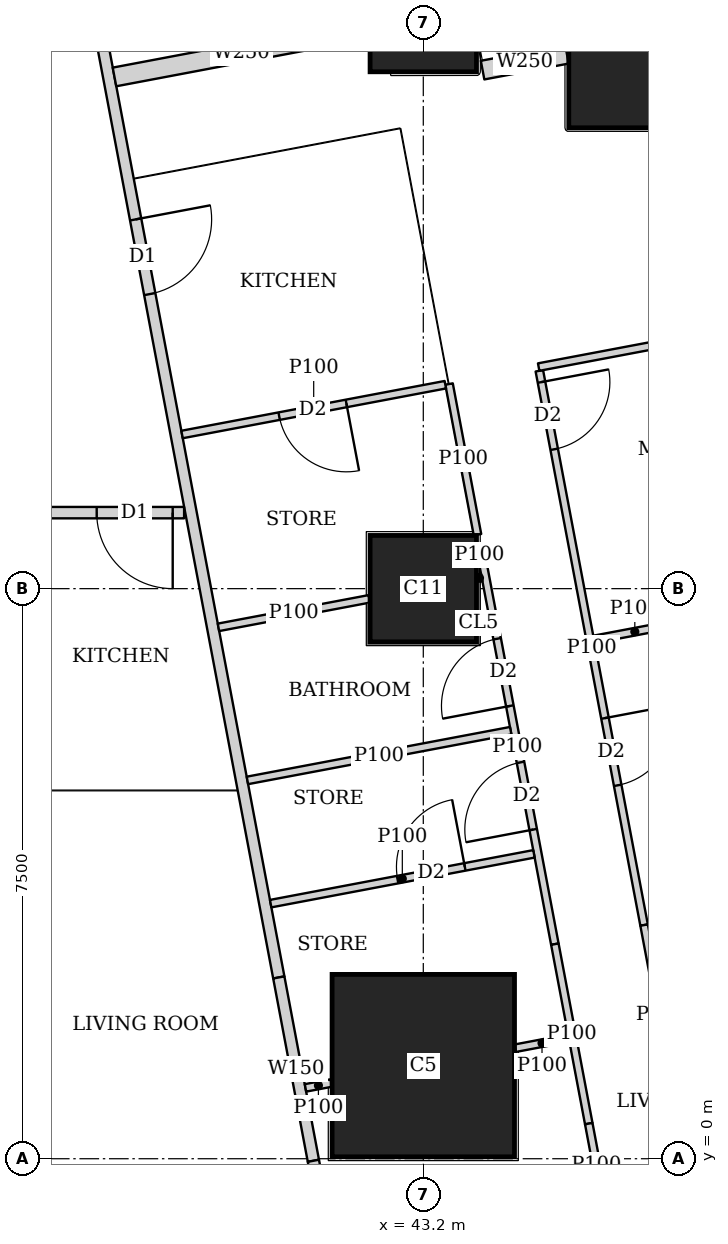
"""IFC4 building model, lengths in metres.
Left out: names, types, materials, properties, quantities, classifications, styles, units other than length and angle.
Written with IfcOpenShell. Run it as: python <this file> out.ifc"""

import sys

from ifc_helpers import new_model, si_unit, direction, frame, frame_2d, origin, origin_2d, place, context, subcontext, project, spatial, rectangle, extrude, element, fill, save


model = new_model("IFC4")
c1 = context("Model", 3, precision=1e-05, world=origin(), true_north=direction((0.0, 1.0)))
c2 = subcontext(c1, "Body", "Model", "MODEL_VIEW")
j1 = project(units=[si_unit("LENGTHUNIT", "METRE"), si_unit("PLANEANGLEUNIT", "RADIAN")], contexts=[c1])
p1 = place(None, origin())
s1 = spatial("IfcSite", under=j1, at=p1, CompositionType="ELEMENT")
p2 = place(p1, origin())
s2 = spatial("IfcBuilding", under=s1, at=p2, CompositionType="ELEMENT")
p3 = place(p2, frame((0.0, 0.0, 223.7)))
s3 = spatial("IfcBuildingStorey", under=s2, at=p3, CompositionType="ELEMENT", Elevation=223.7)
p4 = place(p3, frame((43.2, 1.225, 0.0), z_axis=(0.0, 0.0, 1.0), x_axis=(1.0, 0.0, 0.0)))
e1 = element("IfcColumn", 1, at=p4, inside=s3, PredefinedType="COLUMN", context=c2, shape_type="SweptSolid", body=[
    extrude(rectangle(XDim=2.4, YDim=2.4, at=origin_2d()), origin(), (0.0, 0.0, 1.0), 3.75),
])
for number, where, z_axis, x_axis in (
    (2, (43.2, 7.5, 0.0), (0.0, 0.0, 1.0), (1.0, 0.0, 0.0)),
    (3, (43.2, 15.0, 0.0), (0.0, 0.0, 1.0), (1.0, 0.0, 0.0)),
):
    element("IfcColumn", number, at=place(p3, frame(where, z_axis=z_axis, x_axis=x_axis)), inside=s3, PredefinedType="COLUMN", context=c2, shape_type="SweptSolid", body=[
        extrude(rectangle(XDim=1.4, YDim=1.4, at=origin_2d()), origin(), (0.0, 0.0, 1.0), 3.75),
    ])
p5 = place(p3, frame((46.314, 14.763, 0.0), z_axis=(0.0, 0.0, 1.0), x_axis=(1.0, 0.0, 0.0)))
e4 = element("IfcColumn", 4, at=p5, inside=s3, PredefinedType="COLUMN", context=c2, shape_type="SweptSolid", body=[
    extrude(rectangle(XDim=2.4, YDim=2.4, at=origin_2d()), origin(), (0.0, 0.0, 1.0), 3.75),
])
p6 = place(p3, frame((50.653, 2.703, 0.0), z_axis=(0.0, 0.0, 1.0), x_axis=(-0.185612026696, 0.982623109613, 0.0)))
e5 = element("IfcWall", 5, at=p6, inside=s3, PredefinedType="SOLIDWALL", context=c2, shape_type="SweptSolid", body=[
    extrude(rectangle(XDim=41.393, YDim=0.2, at=frame_2d((20.697, 0.0))), origin(), (0.0, 0.0, 1.0), 3.5),
])
p7 = place(p6, frame((1.633, 0.0, 0.9)))
e6 = element("IfcOpeningElement", 6, at=p7, cuts=e5, PredefinedType="OPENING", context=c2, shape_type="SweptSolid", body=[
    extrude(rectangle(XDim=1.8, YDim=1.5, at=frame_2d((0.9, 0.75))), frame((0.0, 0.11, 0.0), z_axis=(0.0, -1.0, 0.0), x_axis=(1.0, 0.0, 0.0)), (0.0, 0.0, 1.0), 0.22),
])
p8 = place(p6, frame((6.032, 0.0, 0.9)))
e7 = element("IfcOpeningElement", 7, at=p8, cuts=e5, PredefinedType="OPENING", context=c2, shape_type="SweptSolid", body=[
    extrude(rectangle(XDim=1.8, YDim=1.5, at=frame_2d((0.9, 0.75))), frame((0.0, 0.11, 0.0), z_axis=(0.0, -1.0, 0.0), x_axis=(1.0, 0.0, 0.0)), (0.0, 0.0, 1.0), 0.22),
])
p9 = place(p6, frame((9.848, 0.0, 0.9)))
e8 = element("IfcOpeningElement", 8, at=p9, cuts=e5, PredefinedType="OPENING", context=c2, shape_type="SweptSolid", body=[
    extrude(rectangle(XDim=1.8, YDim=1.5, at=frame_2d((0.9, 0.75))), frame((0.0, 0.11, 0.0), z_axis=(0.0, -1.0, 0.0), x_axis=(1.0, 0.0, 0.0)), (0.0, 0.0, 1.0), 0.22),
])
p10 = place(p6, frame((13.664, 0.0, 0.9)))
e9 = element("IfcOpeningElement", 9, at=p10, cuts=e5, PredefinedType="OPENING", context=c2, shape_type="SweptSolid", body=[
    extrude(rectangle(XDim=1.8, YDim=1.5, at=frame_2d((0.9, 0.75))), frame((0.0, 0.11, 0.0), z_axis=(0.0, -1.0, 0.0), x_axis=(1.0, 0.0, 0.0)), (0.0, 0.0, 1.0), 0.22),
])
p11 = place(p6, frame((17.481, 0.0, 0.9)))
e10 = element("IfcOpeningElement", 10, at=p11, cuts=e5, PredefinedType="OPENING", context=c2, shape_type="SweptSolid", body=[
    extrude(rectangle(XDim=1.8, YDim=1.5, at=frame_2d((0.9, 0.75))), frame((0.0, 0.11, 0.0), z_axis=(0.0, -1.0, 0.0), x_axis=(1.0, 0.0, 0.0)), (0.0, 0.0, 1.0), 0.22),
])
p12 = place(p6, frame((21.297, 0.0, 0.9)))
e11 = element("IfcOpeningElement", 11, at=p12, cuts=e5, PredefinedType="OPENING", context=c2, shape_type="SweptSolid", body=[
    extrude(rectangle(XDim=1.8, YDim=1.5, at=frame_2d((0.9, 0.75))), frame((0.0, 0.11, 0.0), z_axis=(0.0, -1.0, 0.0), x_axis=(1.0, 0.0, 0.0)), (0.0, 0.0, 1.0), 0.22),
])
p13 = place(p6, frame((25.113, 0.0, 0.9)))
e12 = element("IfcOpeningElement", 12, at=p13, cuts=e5, PredefinedType="OPENING", context=c2, shape_type="SweptSolid", body=[
    extrude(rectangle(XDim=1.8, YDim=1.5, at=frame_2d((0.9, 0.75))), frame((0.0, 0.11, 0.0), z_axis=(0.0, -1.0, 0.0), x_axis=(1.0, 0.0, 0.0)), (0.0, 0.0, 1.0), 0.22),
])
p14 = place(p6, frame((28.93, 0.0, 0.9)))
e13 = element("IfcOpeningElement", 13, at=p14, cuts=e5, PredefinedType="OPENING", context=c2, shape_type="SweptSolid", body=[
    extrude(rectangle(XDim=1.8, YDim=1.5, at=frame_2d((0.9, 0.75))), frame((0.0, 0.11, 0.0), z_axis=(0.0, -1.0, 0.0), x_axis=(1.0, 0.0, 0.0)), (0.0, 0.0, 1.0), 0.22),
])
p15 = place(p6, frame((32.746, 0.0, 0.9)))
e14 = element("IfcOpeningElement", 14, at=p15, cuts=e5, PredefinedType="OPENING", context=c2, shape_type="SweptSolid", body=[
    extrude(rectangle(XDim=1.8, YDim=1.5, at=frame_2d((0.9, 0.75))), frame((0.0, 0.11, 0.0), z_axis=(0.0, -1.0, 0.0), x_axis=(1.0, 0.0, 0.0)), (0.0, 0.0, 1.0), 0.22),
])
p16 = place(p6, frame((36.481, 0.0, 0.9)))
e15 = element("IfcOpeningElement", 15, at=p16, cuts=e5, PredefinedType="OPENING", context=c2, shape_type="SweptSolid", body=[
    extrude(rectangle(XDim=1.8, YDim=1.5, at=frame_2d((0.9, 0.75))), frame((0.0, 0.11, 0.0), z_axis=(0.0, -1.0, 0.0), x_axis=(1.0, 0.0, 0.0)), (0.0, 0.0, 1.0), 0.22),
])
p17 = place(p3, frame((40.053, 8.5, 0.0), z_axis=(0.0, 0.0, 1.0), x_axis=(-1.0, 0.0, 0.0)))
e16 = element("IfcWall", 16, at=p17, inside=s3, PredefinedType="SOLIDWALL", context=c2, shape_type="SweptSolid", body=[
    extrude(rectangle(XDim=23.798, YDim=0.15, at=frame_2d((11.899, 0.0))), origin(), (0.0, 0.0, 1.0), 3.5),
])
p18 = place(p17, frame((21.978, 0.0, 0.0)))
e17 = element("IfcOpeningElement", 17, at=p18, cuts=e16, PredefinedType="OPENING", context=c2, shape_type="SweptSolid", body=[
    extrude(rectangle(XDim=1.0, YDim=2.1, at=frame_2d((0.5, 1.05))), frame((0.0, 0.085, 0.0), z_axis=(0.0, -1.0, 0.0), x_axis=(1.0, 0.0, 0.0)), (0.0, 0.0, 1.0), 0.17),
])
p19 = place(p17, frame((12.753, 0.0, 0.0)))
e18 = element("IfcOpeningElement", 18, at=p19, cuts=e16, PredefinedType="OPENING", context=c2, shape_type="SweptSolid", body=[
    extrude(rectangle(XDim=1.0, YDim=2.1, at=frame_2d((0.5, 1.05))), frame((0.0, 0.085, 0.0), z_axis=(0.0, -1.0, 0.0), x_axis=(1.0, 0.0, 0.0)), (0.0, 0.0, 1.0), 0.17),
])
p20 = place(p17, frame((0.15, 0.0, 0.0)))
e19 = element("IfcOpeningElement", 19, at=p20, cuts=e16, PredefinedType="OPENING", context=c2, shape_type="SweptSolid", body=[
    extrude(rectangle(XDim=1.0, YDim=2.1, at=frame_2d((0.5, 1.05))), frame((0.0, 0.085, 0.0), z_axis=(0.0, -1.0, 0.0), x_axis=(1.0, 0.0, 0.0)), (0.0, 0.0, 1.0), 0.17),
])
p21 = place(p3, frame((33.68, 42.723, 0.0), z_axis=(0.0, 0.0, 1.0), x_axis=(0.185601160014, -0.982625162207, 0.0)))
e20 = element("IfcWall", 20, at=p21, inside=s3, PredefinedType="SOLIDWALL", context=c2, shape_type="SweptSolid", body=[
    extrude(rectangle(XDim=41.051, YDim=0.15, at=frame_2d((20.526, 0.0))), origin(), (0.0, 0.0, 1.0), 2.5),
])
p22 = place(p21, frame((16.123, 0.0, 0.0)))
e21 = element("IfcOpeningElement", 21, at=p22, cuts=e20, PredefinedType="OPENING", context=c2, shape_type="SweptSolid", body=[
    extrude(rectangle(XDim=1.0, YDim=2.1, at=frame_2d((0.5, 1.05))), frame((0.0, 0.085, 0.0), z_axis=(0.0, -1.0, 0.0), x_axis=(1.0, 0.0, 0.0)), (0.0, 0.0, 1.0), 0.17),
])
p23 = place(p21, frame((19.938, 0.0, 0.0)))
e22 = element("IfcOpeningElement", 22, at=p23, cuts=e20, PredefinedType="OPENING", context=c2, shape_type="SweptSolid", body=[
    extrude(rectangle(XDim=1.0, YDim=2.1, at=frame_2d((0.5, 1.05))), frame((0.0, 0.085, 0.0), z_axis=(0.0, -1.0, 0.0), x_axis=(1.0, 0.0, 0.0)), (0.0, 0.0, 1.0), 0.17),
])
p24 = place(p21, frame((30.902, 0.0, 0.0)))
e23 = element("IfcOpeningElement", 23, at=p24, cuts=e20, PredefinedType="OPENING", context=c2, shape_type="SweptSolid", body=[
    extrude(rectangle(XDim=1.0, YDim=2.1, at=frame_2d((0.5, 1.05))), frame((0.0, 0.085, 0.0), z_axis=(0.0, -1.0, 0.0), x_axis=(1.0, 0.0, 0.0)), (0.0, 0.0, 1.0), 0.17),
])
p25 = place(p3, frame((41.299, 2.385, 0.0), z_axis=(0.0, 0.0, 1.0), x_axis=(0.18529731833, -0.982682504077, 0.0)))
e24 = element("IfcWall", 24, at=p25, inside=s3, PredefinedType="SOLIDWALL", context=c2, shape_type="SweptSolid", body=[
    extrude(rectangle(XDim=2.455, YDim=0.15, at=frame_2d((1.227, 0.0))), origin(), (0.0, 0.0, 1.0), 2.05),
])
p26 = place(p3, frame((41.754, -0.027, 0.0), z_axis=(0.0, 0.0, 1.0), x_axis=(0.186404157015, -0.982473149886, 0.0)))
e25 = element("IfcWall", 25, at=p26, inside=s3, PredefinedType="SOLIDWALL", context=c2, shape_type="SweptSolid", body=[
    extrude(rectangle(XDim=0.634, YDim=0.15, at=frame_2d((0.317, 0.0))), origin(), (0.0, 0.0, 1.0), 3.5),
])
p27 = place(p3, frame((44.727, 10.366, 0.0), z_axis=(0.0, 0.0, 1.0), x_axis=(0.185678775129, -0.982610498858, 0.0)))
e26 = element("IfcWall", 26, at=p27, inside=s3, PredefinedType="PARTITIONING", context=c2, shape_type="SweptSolid", body=[
    extrude(rectangle(XDim=7.421, YDim=0.1, at=frame_2d((3.71, 0.0))), origin(), (0.0, 0.0, 1.0), 3.5),
])
p28 = place(p27, frame((0.151, 0.0, 0.0)))
e27 = element("IfcOpeningElement", 27, at=p28, cuts=e26, PredefinedType="OPENING", context=c2, shape_type="SweptSolid", body=[
    extrude(rectangle(XDim=0.9, YDim=2.1, at=frame_2d((0.45, 1.05))), frame((0.0, 0.06, 0.0), z_axis=(0.0, -1.0, 0.0), x_axis=(1.0, 0.0, 0.0)), (0.0, 0.0, 1.0), 0.12),
])
p29 = place(p27, frame((4.65, 0.0, 0.0)))
e28 = element("IfcOpeningElement", 28, at=p29, cuts=e26, PredefinedType="OPENING", context=c2, shape_type="SweptSolid", body=[
    extrude(rectangle(XDim=0.9, YDim=2.1, at=frame_2d((0.45, 1.05))), frame((0.0, 0.06, 0.0), z_axis=(0.0, -1.0, 0.0), x_axis=(1.0, 0.0, 0.0)), (0.0, 0.0, 1.0), 0.12),
])
p30 = place(p3, frame((46.105, 3.074, 0.0), z_axis=(0.0, 0.0, 1.0), x_axis=(0.185631845838, -0.982619365681, 0.0)))
e29 = element("IfcWall", 29, at=p30, inside=s3, PredefinedType="PARTITIONING", context=c2, shape_type="SweptSolid", body=[
    extrude(rectangle(XDim=2.403, YDim=0.1, at=frame_2d((1.201, 0.0))), origin(), (0.0, 0.0, 1.0), 2.05),
])
p31 = place(p3, frame((43.539, 10.192, 0.0), z_axis=(0.0, 0.0, 1.0), x_axis=(0.185443145218, -0.982654995353, 0.0)))
e30 = element("IfcWall", 30, at=p31, inside=s3, PredefinedType="PARTITIONING", context=c2, shape_type="SweptSolid", body=[
    extrude(rectangle(XDim=2.017, YDim=0.1, at=frame_2d((1.008, 0.0))), origin(), (0.0, 0.0, 1.0), 3.5),
])
p32 = place(p3, frame((43.949, 8.02, 0.0), z_axis=(0.0, 0.0, 1.0), x_axis=(0.185656792073, -0.982614652627, 0.0)))
e31 = element("IfcWall", 31, at=p32, inside=s3, PredefinedType="PARTITIONING", context=c2, shape_type="SweptSolid", body=[
    extrude(rectangle(XDim=5.289, YDim=0.1, at=frame_2d((2.645, 0.0))), origin(), (0.0, 0.0, 1.0), 3.5),
])
p33 = place(p32, frame((1.2, 0.0, 0.0)))
e32 = element("IfcOpeningElement", 32, at=p33, cuts=e31, PredefinedType="OPENING", context=c2, shape_type="SweptSolid", body=[
    extrude(rectangle(XDim=0.9, YDim=2.1, at=frame_2d((0.45, 1.05))), frame((0.0, 0.06, 0.0), z_axis=(0.0, -1.0, 0.0), x_axis=(1.0, 0.0, 0.0)), (0.0, 0.0, 1.0), 0.12),
])
p34 = place(p32, frame((2.855, 0.0, 0.0)))
e33 = element("IfcOpeningElement", 33, at=p34, cuts=e31, PredefinedType="OPENING", context=c2, shape_type="SweptSolid", body=[
    extrude(rectangle(XDim=0.9, YDim=2.1, at=frame_2d((0.45, 1.05))), frame((0.0, 0.06, 0.0), z_axis=(0.0, -1.0, 0.0), x_axis=(1.0, 0.0, 0.0)), (0.0, 0.0, 1.0), 0.12),
])
p35 = place(p3, frame((44.931, 2.823, 0.0), z_axis=(0.0, 0.0, 1.0), x_axis=(0.185631845838, -0.982619365681, 0.0)))
e34 = element("IfcWall", 34, at=p35, inside=s3, PredefinedType="PARTITIONING", context=c2, shape_type="SweptSolid", body=[
    extrude(rectangle(XDim=2.403, YDim=0.1, at=frame_2d((1.201, 0.0))), origin(), (0.0, 0.0, 1.0), 2.05),
])
p36 = place(p3, frame((45.377, 0.462, 0.0), z_axis=(0.0, 0.0, 1.0), x_axis=(0.185513480919, -0.982641719243, 0.0)))
e35 = element("IfcWall", 35, at=p36, inside=s3, PredefinedType="PARTITIONING", context=c2, shape_type="SweptSolid", body=[
    extrude(rectangle(XDim=1.095, YDim=0.1, at=frame_2d((0.547, 0.0))), origin(), (0.0, 0.0, 1.0), 3.5),
])
p37 = place(p3, frame((48.943, 11.213, 0.0), z_axis=(0.0, 0.0, 1.0), x_axis=(-0.982633535512, -0.185556823879, 0.0)))
e36 = element("IfcWall", 36, at=p37, inside=s3, PredefinedType="PARTITIONING", context=c2, shape_type="SweptSolid", body=[
    extrude(rectangle(XDim=4.3, YDim=0.1, at=frame_2d((2.15, 0.0))), origin(), (0.0, 0.0, 1.0), 2.05),
])
p38 = place(p3, frame((46.52, 7.035, 0.0), z_axis=(0.0, 0.0, 1.0), x_axis=(-0.982620932907, -0.185623549726, 0.0)))
e37 = element("IfcWall", 37, at=p38, inside=s3, PredefinedType="PARTITIONING", context=c2, shape_type="SweptSolid", body=[
    extrude(rectangle(XDim=1.093, YDim=0.1, at=frame_2d((0.546, 0.0))), origin(), (0.0, 0.0, 1.0), 3.5),
])
p39 = place(p3, frame((43.49, 10.183, 0.0), z_axis=(0.0, 0.0, 1.0), x_axis=(-0.982588017646, -0.185797706064, 0.0)))
e38 = element("IfcWall", 38, at=p39, inside=s3, PredefinedType="PARTITIONING", context=c2, shape_type="SweptSolid", body=[
    extrude(rectangle(XDim=3.525, YDim=0.1, at=frame_2d((1.763, 0.0))), origin(), (0.0, 0.0, 1.0), 3.5),
])
p40 = place(p39, frame((1.325, 0.0, 0.0)))
e39 = element("IfcOpeningElement", 39, at=p40, cuts=e38, PredefinedType="OPENING", context=c2, shape_type="SweptSolid", body=[
    extrude(rectangle(XDim=0.9, YDim=2.1, at=frame_2d((0.45, 1.05))), frame((0.0, 0.06, 0.0), z_axis=(0.0, -1.0, 0.0), x_axis=(1.0, 0.0, 0.0)), (0.0, 0.0, 1.0), 0.12),
])
p41 = place(p3, frame((43.969, 7.646, 0.0), z_axis=(0.0, 0.0, 1.0), x_axis=(-0.983147034646, -0.182816597351, 0.0)))
e40 = element("IfcWall", 40, at=p41, inside=s3, PredefinedType="PARTITIONING", context=c2, shape_type="SweptSolid", body=[
    extrude(rectangle(XDim=0.06, YDim=0.1, at=frame_2d((0.03, 0.0))), origin(), (0.0, 0.0, 1.0), 3.5),
])
p42 = place(p3, frame((42.49, 7.366, 0.0), z_axis=(0.0, 0.0, 1.0), x_axis=(-0.982620917875, -0.185623629302, 0.0)))
e41 = element("IfcWall", 41, at=p42, inside=s3, PredefinedType="PARTITIONING", context=c2, shape_type="SweptSolid", body=[
    extrude(rectangle(XDim=2.02, YDim=0.1, at=frame_2d((1.01, 0.0))), origin(), (0.0, 0.0, 1.0), 3.5),
])
p43 = place(p3, frame((45.114, 1.587, 0.0), z_axis=(0.0, 0.0, 1.0), x_axis=(-0.982671022916, -0.185358195723, 0.0)))
e42 = element("IfcWall", 42, at=p43, inside=s3, PredefinedType="PARTITIONING", context=c2, shape_type="SweptSolid", body=[
    extrude(rectangle(XDim=0.717, YDim=0.1, at=frame_2d((0.358, 0.0))), origin(), (0.0, 0.0, 1.0), 2.05),
])
p44 = place(p3, frame((41.99, 0.996, 0.0), z_axis=(0.0, 0.0, 1.0), x_axis=(-0.982639822555, -0.185523527159, 0.0)))
e43 = element("IfcWall", 43, at=p44, inside=s3, PredefinedType="PARTITIONING", context=c2, shape_type="SweptSolid", body=[
    extrude(rectangle(XDim=0.346, YDim=0.1, at=frame_2d((0.173, 0.0))), origin(), (0.0, 0.0, 1.0), 2.05),
])
p45 = place(p3, frame((44.35, 5.631, 0.0), z_axis=(0.0, 0.0, 1.0), x_axis=(-0.982638553676, -0.185530247748, 0.0)))
e44 = element("IfcWall", 44, at=p45, inside=s3, PredefinedType="PARTITIONING", context=c2, shape_type="SweptSolid", body=[
    extrude(rectangle(XDim=3.525, YDim=0.1, at=frame_2d((1.763, 0.0))), origin(), (0.0, 0.0, 1.0), 3.5),
])
p46 = place(p3, frame((45.09, 14.531, 0.0), z_axis=(0.0, 0.0, 1.0), x_axis=(-0.982737354171, -0.185006196431, 0.0)))
e45 = element("IfcWall", 45, at=p46, inside=s3, PredefinedType="SOLIDWALL", context=c2, shape_type="SweptSolid", body=[
    extrude(rectangle(XDim=1.13, YDim=0.25, at=frame_2d((0.565, 0.0))), origin(), (0.0, 0.0, 1.0), 2.05),
])
p47 = place(p3, frame((42.476, 14.863, 0.0), z_axis=(0.0, 0.0, 1.0), x_axis=(-0.982603567712, -0.185715450942, 0.0)))
e46 = element("IfcWall", 46, at=p47, inside=s3, PredefinedType="SOLIDWALL", context=c2, shape_type="SweptSolid", body=[
    extrude(rectangle(XDim=3.398, YDim=0.25, at=frame_2d((1.699, 0.0))), origin(), (0.0, 0.0, 1.0), 3.5),
])
p48 = place(p3, frame((41.192, 3.356, 0.0), z_axis=(0.0, 0.0, 1.0), x_axis=(0.982588017646, 0.185797706064, 0.0)))
e47 = element("IfcWall", 47, at=p48, inside=s3, PredefinedType="PARTITIONING", context=c2, shape_type="SweptSolid", body=[
    extrude(rectangle(XDim=3.525, YDim=0.1, at=frame_2d((1.763, 0.0))), origin(), (0.0, 0.0, 1.0), 3.5),
])
p49 = place(p48, frame((1.7, 0.0, 0.0)))
e48 = element("IfcOpeningElement", 48, at=p49, cuts=e47, PredefinedType="OPENING", context=c2, shape_type="SweptSolid", body=[
    extrude(rectangle(XDim=0.9, YDim=2.1, at=frame_2d((0.45, 1.05))), frame((0.0, 0.06, 0.0), z_axis=(0.0, -1.0, 0.0), x_axis=(1.0, 0.0, 0.0)), (0.0, 0.0, 1.0), 0.12),
])
p50 = place(p20, origin())
e49 = element("IfcDoor", 49, at=p50, inside=s3, OperationType="SINGLE_SWING_LEFT", PredefinedType="DOOR", context=c2, shape_type="SweptSolid", body=[
    extrude(rectangle(XDim=1.0, YDim=2.1, at=frame_2d((0.5, 1.05))), frame((0.0, 0.025, 0.0), z_axis=(0.0, -1.0, 0.0), x_axis=(1.0, 0.0, 0.0)), (0.0, 0.0, 1.0), 0.05),
])
fill(e19, e49)
p51 = place(p28, origin())
e50 = element("IfcDoor", 50, at=p51, inside=s3, OperationType="SINGLE_SWING_LEFT", PredefinedType="DOOR", context=c2, shape_type="SweptSolid", body=[
    extrude(rectangle(XDim=0.9, YDim=2.1, at=frame_2d((0.45, 1.05))), frame((0.0, 0.025, 0.0), z_axis=(0.0, -1.0, 0.0), x_axis=(1.0, 0.0, 0.0)), (0.0, 0.0, 1.0), 0.05),
])
fill(e27, e50)
p52 = place(p29, origin())
e51 = element("IfcDoor", 51, at=p52, inside=s3, OperationType="SINGLE_SWING_LEFT", PredefinedType="DOOR", context=c2, shape_type="SweptSolid", body=[
    extrude(rectangle(XDim=0.9, YDim=2.1, at=frame_2d((0.45, 1.05))), frame((0.0, 0.025, 0.0), z_axis=(0.0, -1.0, 0.0), x_axis=(1.0, 0.0, 0.0)), (0.0, 0.0, 1.0), 0.05),
])
fill(e28, e51)
p53 = place(p33, origin())
e52 = element("IfcDoor", 52, at=p53, inside=s3, OperationType="SINGLE_SWING_LEFT", PredefinedType="DOOR", context=c2, shape_type="SweptSolid", body=[
    extrude(rectangle(XDim=0.9, YDim=2.1, at=frame_2d((0.45, 1.05))), frame((0.0, 0.025, 0.0), z_axis=(0.0, -1.0, 0.0), x_axis=(1.0, 0.0, 0.0)), (0.0, 0.0, 1.0), 0.05),
])
fill(e32, e52)
p54 = place(p34, origin())
e53 = element("IfcDoor", 53, at=p54, inside=s3, OperationType="SINGLE_SWING_LEFT", PredefinedType="DOOR", context=c2, shape_type="SweptSolid", body=[
    extrude(rectangle(XDim=0.9, YDim=2.1, at=frame_2d((0.45, 1.05))), frame((0.0, 0.025, 0.0), z_axis=(0.0, -1.0, 0.0), x_axis=(1.0, 0.0, 0.0)), (0.0, 0.0, 1.0), 0.05),
])
fill(e33, e53)
p55 = place(p24, origin())
e54 = element("IfcDoor", 54, at=p55, inside=s3, OperationType="SINGLE_SWING_LEFT", PredefinedType="DOOR", context=c2, shape_type="SweptSolid", body=[
    extrude(rectangle(XDim=1.0, YDim=2.1, at=frame_2d((0.5, 1.05))), frame((0.0, 0.025, 0.0), z_axis=(0.0, -1.0, 0.0), x_axis=(1.0, 0.0, 0.0)), (0.0, 0.0, 1.0), 0.05),
])
fill(e23, e54)
p56 = place(p40, origin())
e55 = element("IfcDoor", 55, at=p56, inside=s3, OperationType="SINGLE_SWING_LEFT", PredefinedType="DOOR", context=c2, shape_type="SweptSolid", body=[
    extrude(rectangle(XDim=0.9, YDim=2.1, at=frame_2d((0.45, 1.05))), frame((0.0, 0.025, 0.0), z_axis=(0.0, -1.0, 0.0), x_axis=(1.0, 0.0, 0.0)), (0.0, 0.0, 1.0), 0.05),
])
fill(e39, e55)
p57 = place(p49, origin())
e56 = element("IfcDoor", 56, at=p57, inside=s3, OperationType="SINGLE_SWING_RIGHT", PredefinedType="DOOR", context=c2, shape_type="SweptSolid", body=[
    extrude(rectangle(XDim=0.9, YDim=2.1, at=frame_2d((0.45, 1.05))), frame((0.0, 0.025, 0.0), z_axis=(0.0, -1.0, 0.0), x_axis=(1.0, 0.0, 0.0)), (0.0, 0.0, 1.0), 0.05),
])
fill(e48, e56)
save(model, sys.argv[1])
